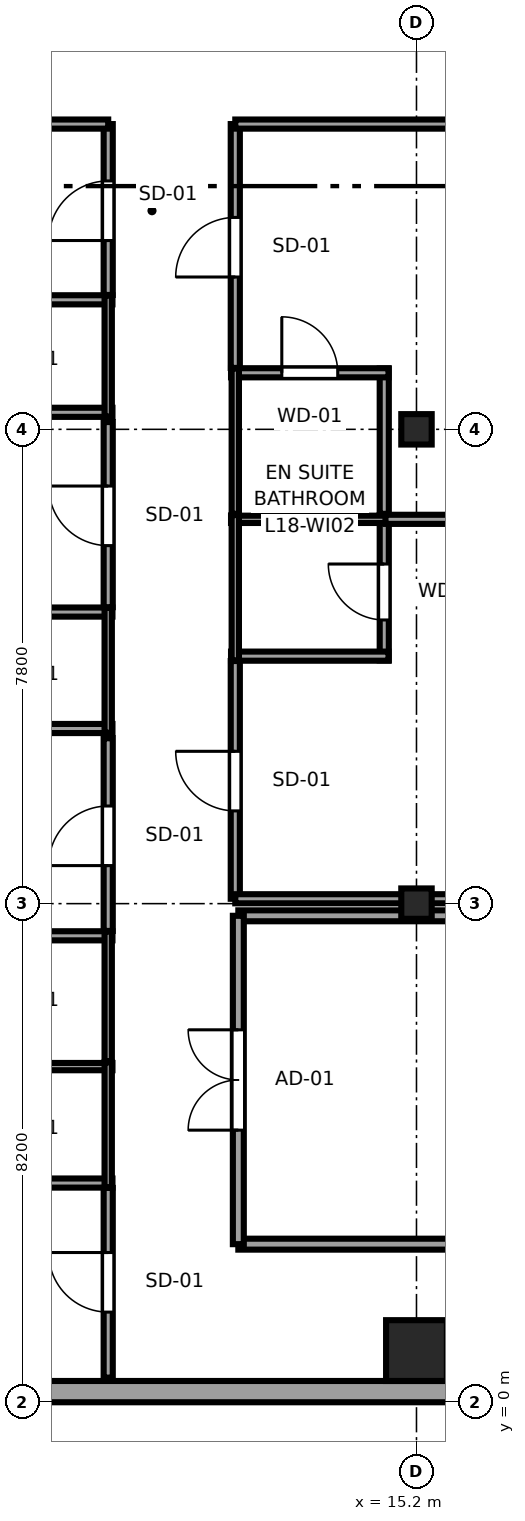
"""IFC4 building model, lengths in metres.
Left out: names, types, materials, properties, quantities, classifications, styles, units other than length and angle.
Written with IfcOpenShell. Run it as: python <this file> out.ifc"""

import sys

from ifc_helpers import new_model, si_unit, direction, frame, frame_2d, origin, origin_2d, place, context, subcontext, project, spatial, rectangle, i_section, extrude, source, transform, mapped, element, fill, save


model = new_model("IFC4")
c1 = context("Model", 3, precision=1e-05, world=origin(), true_north=direction((0.0, 1.0)))
c2 = subcontext(c1, "Body", "Model", "MODEL_VIEW")
j1 = project(units=[si_unit("LENGTHUNIT", "METRE"), si_unit("PLANEANGLEUNIT", "RADIAN")], contexts=[c1])
p1 = place(None, origin())
s1 = spatial("IfcSite", under=j1, at=p1, CompositionType="ELEMENT")
p2 = place(p1, origin())
s2 = spatial("IfcBuilding", under=s1, at=p2, CompositionType="ELEMENT")
p3 = place(p2, frame((0.0, 0.0, 74.6)))
s3 = spatial("IfcBuildingStorey", under=s2, at=p3, CompositionType="ELEMENT", Elevation=74.6)
m1 = source(origin(), c2, "Body", "SweptSolid", [
    extrude(rectangle(XDim=1.0, YDim=1.0, at=origin_2d()), origin(), (0.0, 0.0, 1.0), 3.55),
])
p4 = place(p3, frame((15.2, 0.85, 0.0), z_axis=(0.0, 0.0, 1.0), x_axis=(1.0, 0.0, 0.0)))
e1 = element("IfcColumn", 1, at=p4, inside=s3, PredefinedType="COLUMN", context=c2, shape_type="MappedRepresentation", body=[
    mapped(m1, transform((0.0, 0.0, 0.0), x_axis=(1.0, 0.0, 0.0), y_axis=(0.0, 1.0, 0.0), z_axis=(0.0, 0.0, 1.0), scale=1.0)),
])
m2 = source(origin(), c2, "Body", "SweptSolid", [
    extrude(i_section(OverallWidth=0.5, OverallDepth=0.5, WebThickness=0.028, FlangeThickness=0.045, at=origin_2d()), origin(), (0.0, 0.0, 1.0), 3.55),
])
for number, where, z_axis, x_axis in (
    (2, (15.2, 8.2, 0.0), (0.0, 0.0, 1.0), (1.0, 0.0, 0.0)),
    (3, (15.2, 16.0, 0.0), (0.0, 0.0, 1.0), (1.0, 0.0, 0.0)),
):
    element("IfcColumn", number, at=place(p3, frame(where, z_axis=z_axis, x_axis=x_axis)), inside=s3, PredefinedType="COLUMN", context=c2, shape_type="MappedRepresentation", body=[
        mapped(m2, transform((0.0, 0.0, 0.0), x_axis=(1.0, 0.0, 0.0), y_axis=(0.0, 1.0, 0.0), z_axis=(0.0, 0.0, 1.0), scale=1.0)),
    ])
p5 = place(p3, frame((4.617, 0.175, 0.0), z_axis=(0.0, 0.0, 1.0), x_axis=(1.0, 0.0, 0.0)))
e4 = element("IfcWall", 4, at=p5, inside=s3, PredefinedType="SOLIDWALL", context=c2, shape_type="SweptSolid", body=[
    extrude(rectangle(XDim=18.008, YDim=0.35, at=frame_2d((9.004, 0.0))), origin(), (0.0, 0.0, 1.0), 3.37),
])
p6 = place(p5, frame((14.257, 0.0, 0.68)))
e5 = element("IfcOpeningElement", 5, at=p6, cuts=e4, PredefinedType="OPENING", context=c2, shape_type="SweptSolid", body=[
    extrude(rectangle(XDim=2.1, YDim=1.9, at=frame_2d((1.05, 0.95))), frame((0.0, 0.185, 0.0), z_axis=(0.0, -1.0, 0.0), x_axis=(1.0, 0.0, 0.0)), (0.0, 0.0, 1.0), 0.37),
])
p7 = place(p5, frame((0.8, 0.0, 0.62)))
e6 = element("IfcOpeningElement", 6, at=p7, cuts=e4, PredefinedType="OPENING", context=c2, shape_type="SweptSolid", body=[
    extrude(rectangle(XDim=1.5, YDim=1.55, at=frame_2d((0.75, 0.775))), frame((0.0, 0.185, 0.0), z_axis=(0.0, -1.0, 0.0), x_axis=(1.0, 0.0, 0.0)), (0.0, 0.0, 1.0), 0.37),
])
p8 = place(p3, frame((7.61, 3.605, 0.0), z_axis=(0.0, 0.0, 1.0), x_axis=(1.0, 0.0, 0.0)))
e7 = element("IfcWall", 7, at=p8, inside=s3, PredefinedType="PARTITIONING", context=c2, shape_type="SweptSolid", body=[
    extrude(rectangle(XDim=2.59, YDim=0.15, at=frame_2d((1.295, 0.0))), origin(), (0.0, 0.0, 1.0), 3.37),
])
p9 = place(p3, frame((7.61, 5.52, 0.0), z_axis=(0.0, 0.0, 1.0), x_axis=(1.0, 0.0, 0.0)))
e8 = element("IfcWall", 8, at=p9, inside=s3, PredefinedType="PLUMBINGWALL", context=c2, shape_type="SweptSolid", body=[
    extrude(rectangle(XDim=2.59, YDim=0.12, at=frame_2d((1.295, 0.0))), origin(), (0.0, 0.0, 1.0), 3.37),
])
p10 = place(p3, frame((10.13, 3.535, 0.0), z_axis=(0.0, 0.0, 1.0), x_axis=(0.0, 1.0, 0.0)))
e9 = element("IfcWall", 9, at=p10, inside=s3, PredefinedType="PLUMBINGWALL", context=c2, shape_type="SweptSolid", body=[
    extrude(rectangle(XDim=2.055, YDim=0.12, at=frame_2d((1.028, 0.0))), origin(), (0.0, 0.0, 1.0), 3.37),
])
p11 = place(p3, frame((7.61, 7.671, 0.0), z_axis=(0.0, 0.0, 1.0), x_axis=(1.0, 0.0, 0.0)))
e10 = element("IfcWall", 10, at=p11, inside=s3, PredefinedType="PARTITIONING", context=c2, shape_type="SweptSolid", body=[
    extrude(rectangle(XDim=2.59, YDim=0.15, at=frame_2d((1.295, 0.0))), origin(), (0.0, 0.0, 1.0), 3.37),
])
p12 = place(p3, frame((10.13, 5.61, 0.0), z_axis=(0.0, 0.0, 1.0), x_axis=(0.0, 1.0, 0.0)))
e11 = element("IfcWall", 11, at=p12, inside=s3, PredefinedType="PLUMBINGWALL", context=c2, shape_type="SweptSolid", body=[
    extrude(rectangle(XDim=2.131, YDim=0.12, at=frame_2d((1.065, 0.0))), origin(), (0.0, 0.0, 1.0), 3.37),
])
p13 = place(p3, frame((0.405, 11.08, 0.0), z_axis=(0.0, 0.0, 1.0), x_axis=(1.0, 0.0, 0.0)))
e12 = element("IfcWall", 12, at=p13, inside=s3, PredefinedType="PARTITIONING", context=c2, shape_type="SweptSolid", body=[
    extrude(rectangle(XDim=9.795, YDim=0.15, at=frame_2d((4.897, 0.0))), origin(), (0.0, 0.0, 1.0), 3.37),
])
p14 = place(p3, frame((7.61, 12.995, 0.0), z_axis=(0.0, 0.0, 1.0), x_axis=(1.0, 0.0, 0.0)))
e13 = element("IfcWall", 13, at=p14, inside=s3, PredefinedType="PARTITIONING", context=c2, shape_type="SweptSolid", body=[
    extrude(rectangle(XDim=2.59, YDim=0.15, at=frame_2d((1.295, 0.0))), origin(), (0.0, 0.0, 1.0), 3.37),
])
p15 = place(p3, frame((10.13, 11.01, 0.0), z_axis=(0.0, 0.0, 1.0), x_axis=(0.0, 1.0, 0.0)))
e14 = element("IfcWall", 14, at=p15, inside=s3, PredefinedType="PLUMBINGWALL", context=c2, shape_type="SweptSolid", body=[
    extrude(rectangle(XDim=2.055, YDim=0.12, at=frame_2d((1.027, 0.0))), origin(), (0.0, 0.0, 1.0), 3.37),
])
p16 = place(p3, frame((0.405, 16.28, 0.0), z_axis=(0.0, 0.0, 1.0), x_axis=(1.0, 0.0, 0.0)))
e15 = element("IfcWall", 15, at=p16, inside=s3, PredefinedType="PARTITIONING", context=c2, shape_type="SweptSolid", body=[
    extrude(rectangle(XDim=9.795, YDim=0.15, at=frame_2d((4.897, 0.0))), origin(), (0.0, 0.0, 1.0), 3.37),
])
p17 = place(p3, frame((7.61, 18.13, 0.0), z_axis=(0.0, 0.0, 1.0), x_axis=(1.0, 0.0, 0.0)))
e16 = element("IfcWall", 16, at=p17, inside=s3, PredefinedType="PARTITIONING", context=c2, shape_type="SweptSolid", body=[
    extrude(rectangle(XDim=2.59, YDim=0.15, at=frame_2d((1.295, 0.0))), origin(), (0.0, 0.0, 1.0), 3.37),
])
p18 = place(p3, frame((10.13, 16.21, 0.0), z_axis=(0.0, 0.0, 1.0), x_axis=(0.0, 1.0, 0.0)))
e17 = element("IfcWall", 17, at=p18, inside=s3, PredefinedType="PLUMBINGWALL", context=c2, shape_type="SweptSolid", body=[
    extrude(rectangle(XDim=1.99, YDim=0.12, at=frame_2d((0.995, 0.0))), origin(), (0.0, 0.0, 1.0), 3.37),
])
p19 = place(p3, frame((14.67, 12.2, 0.0), z_axis=(0.0, 0.0, 1.0), x_axis=(0.0, 1.0, 0.0)))
e18 = element("IfcWall", 18, at=p19, inside=s3, PredefinedType="PARTITIONING", context=c2, shape_type="SweptSolid", body=[
    extrude(rectangle(XDim=2.39, YDim=0.15, at=frame_2d((1.195, 0.0))), origin(), (0.0, 0.0, 1.0), 3.37),
])
p20 = place(p19, frame((0.665, 0.0, 0.0)))
e19 = element("IfcOpeningElement", 19, at=p20, cuts=e18, PredefinedType="OPENING", context=c2, shape_type="SweptSolid", body=[
    extrude(rectangle(XDim=0.92, YDim=2.01, at=frame_2d((0.46, 1.005))), frame((0.0, 0.085, 0.0), z_axis=(0.0, -1.0, 0.0), x_axis=(1.0, 0.0, 0.0)), (0.0, 0.0, 1.0), 0.17),
])
p21 = place(p3, frame((12.15, 12.27, 0.0), z_axis=(0.0, 0.0, 1.0), x_axis=(1.0, 0.0, 0.0)))
e20 = element("IfcWall", 20, at=p21, inside=s3, PredefinedType="PARTITIONING", context=c2, shape_type="SweptSolid", body=[
    extrude(rectangle(XDim=2.59, YDim=0.15, at=frame_2d((1.295, 0.0))), origin(), (0.0, 0.0, 1.0), 3.37),
])
p22 = place(p3, frame((12.15, 14.52, 0.0), z_axis=(0.0, 0.0, 1.0), x_axis=(1.0, 0.0, 0.0)))
e21 = element("IfcWall", 21, at=p22, inside=s3, PredefinedType="PLUMBINGWALL", context=c2, shape_type="SweptSolid", body=[
    extrude(rectangle(XDim=2.59, YDim=0.12, at=frame_2d((1.295, 0.0))), origin(), (0.0, 0.0, 1.0), 3.37),
])
p23 = place(p3, frame((12.22, 12.2, 0.0), z_axis=(0.0, 0.0, 1.0), x_axis=(0.0, 1.0, 0.0)))
e22 = element("IfcWall", 22, at=p23, inside=s3, PredefinedType="PLUMBINGWALL", context=c2, shape_type="SweptSolid", body=[
    extrude(rectangle(XDim=2.39, YDim=0.12, at=frame_2d((1.195, 0.0))), origin(), (0.0, 0.0, 1.0), 3.37),
])
p24 = place(p3, frame((14.67, 14.61, 0.0), z_axis=(0.0, 0.0, 1.0), x_axis=(0.0, 1.0, 0.0)))
e23 = element("IfcWall", 23, at=p24, inside=s3, PredefinedType="PARTITIONING", context=c2, shape_type="SweptSolid", body=[
    extrude(rectangle(XDim=2.39, YDim=0.15, at=frame_2d((1.195, 0.0))), origin(), (0.0, 0.0, 1.0), 3.37),
])
p25 = place(p3, frame((12.15, 16.93, 0.0), z_axis=(0.0, 0.0, 1.0), x_axis=(1.0, 0.0, 0.0)))
e24 = element("IfcWall", 24, at=p25, inside=s3, PredefinedType="PARTITIONING", context=c2, shape_type="SweptSolid", body=[
    extrude(rectangle(XDim=2.59, YDim=0.15, at=frame_2d((1.295, 0.0))), origin(), (0.0, 0.0, 1.0), 3.37),
])
p26 = place(p25, frame((0.835, 0.0, 0.0)))
e25 = element("IfcOpeningElement", 25, at=p26, cuts=e24, PredefinedType="OPENING", context=c2, shape_type="SweptSolid", body=[
    extrude(rectangle(XDim=0.92, YDim=2.01, at=frame_2d((0.46, 1.005))), frame((0.0, 0.085, 0.0), z_axis=(0.0, -1.0, 0.0), x_axis=(1.0, 0.0, 0.0)), (0.0, 0.0, 1.0), 0.17),
])
p27 = place(p3, frame((12.22, 14.61, 0.0), z_axis=(0.0, 0.0, 1.0), x_axis=(0.0, 1.0, 0.0)))
e26 = element("IfcWall", 26, at=p27, inside=s3, PredefinedType="PLUMBINGWALL", context=c2, shape_type="SweptSolid", body=[
    extrude(rectangle(XDim=2.39, YDim=0.12, at=frame_2d((1.195, 0.0))), origin(), (0.0, 0.0, 1.0), 3.37),
])
p28 = place(p3, frame((10.13, 0.405, 0.0), z_axis=(0.0, 0.0, 1.0), x_axis=(0.0, 1.0, 0.0)))
e27 = element("IfcWall", 27, at=p28, inside=s3, PredefinedType="PARTITIONING", context=c2, shape_type="SweptSolid", body=[
    extrude(rectangle(XDim=3.12, YDim=0.15, at=frame_2d((1.56, 0.0))), origin(), (0.0, 0.0, 1.0), 3.37),
])
p29 = place(p28, frame((1.077, 0.0, 0.0)))
e28 = element("IfcOpeningElement", 28, at=p29, cuts=e27, PredefinedType="OPENING", context=c2, shape_type="SweptSolid", body=[
    extrude(rectangle(XDim=0.98, YDim=2.12, at=frame_2d((0.49, 1.06))), frame((0.0, 0.085, 0.0), z_axis=(0.0, -1.0, 0.0), x_axis=(1.0, 0.0, 0.0)), (0.0, 0.0, 1.0), 0.17),
])
p30 = place(p3, frame((10.13, 7.751, 0.0), z_axis=(0.0, 0.0, 1.0), x_axis=(0.0, 1.0, 0.0)))
e29 = element("IfcWall", 29, at=p30, inside=s3, PredefinedType="PARTITIONING", context=c2, shape_type="SweptSolid", body=[
    extrude(rectangle(XDim=3.169, YDim=0.15, at=frame_2d((1.584, 0.0))), origin(), (0.0, 0.0, 1.0), 3.37),
])
p31 = place(p30, frame((1.074, 0.0, 0.0)))
e30 = element("IfcOpeningElement", 30, at=p31, cuts=e29, PredefinedType="OPENING", context=c2, shape_type="SweptSolid", body=[
    extrude(rectangle(XDim=0.98, YDim=2.12, at=frame_2d((0.49, 1.06))), frame((0.0, 0.085, 0.0), z_axis=(0.0, -1.0, 0.0), x_axis=(1.0, 0.0, 0.0)), (0.0, 0.0, 1.0), 0.17),
])
p32 = place(p3, frame((10.13, 13.075, 0.0), z_axis=(0.0, 0.0, 1.0), x_axis=(0.0, 1.0, 0.0)))
e31 = element("IfcWall", 31, at=p32, inside=s3, PredefinedType="PARTITIONING", context=c2, shape_type="SweptSolid", body=[
    extrude(rectangle(XDim=3.045, YDim=0.15, at=frame_2d((1.522, 0.0))), origin(), (0.0, 0.0, 1.0), 3.37),
])
p33 = place(p32, frame((1.012, 0.0, 0.0)))
e32 = element("IfcOpeningElement", 32, at=p33, cuts=e31, PredefinedType="OPENING", context=c2, shape_type="SweptSolid", body=[
    extrude(rectangle(XDim=0.98, YDim=2.12, at=frame_2d((0.49, 1.06))), frame((0.0, 0.085, 0.0), z_axis=(0.0, -1.0, 0.0), x_axis=(1.0, 0.0, 0.0)), (0.0, 0.0, 1.0), 0.17),
])
p34 = place(p3, frame((10.13, 18.21, 0.0), z_axis=(0.0, 0.0, 1.0), x_axis=(0.0, 1.0, 0.0)))
e33 = element("IfcWall", 33, at=p34, inside=s3, PredefinedType="PARTITIONING", context=c2, shape_type="SweptSolid", body=[
    extrude(rectangle(XDim=2.81, YDim=0.15, at=frame_2d((1.405, 0.0))), origin(), (0.0, 0.0, 1.0), 3.37),
])
p35 = place(p34, frame((0.895, 0.0, 0.0)))
e34 = element("IfcOpeningElement", 34, at=p35, cuts=e33, PredefinedType="OPENING", context=c2, shape_type="SweptSolid", body=[
    extrude(rectangle(XDim=0.98, YDim=2.12, at=frame_2d((0.49, 1.06))), frame((0.0, 0.085, 0.0), z_axis=(0.0, -1.0, 0.0), x_axis=(1.0, 0.0, 0.0)), (0.0, 0.0, 1.0), 0.17),
])
p36 = place(p3, frame((0.405, 21.02, 0.0), z_axis=(0.0, 0.0, 1.0), x_axis=(1.0, 0.0, 0.0)))
e35 = element("IfcWall", 35, at=p36, inside=s3, PredefinedType="PARTITIONING", context=c2, shape_type="SweptSolid", body=[
    extrude(rectangle(XDim=9.725, YDim=0.15, at=frame_2d((4.862, 0.0))), origin(), (0.0, 0.0, 1.0), 3.37),
])
p37 = place(p3, frame((12.22, 8.28, 0.0), z_axis=(0.0, 0.0, 1.0), x_axis=(0.0, 1.0, 0.0)))
e36 = element("IfcWall", 36, at=p37, inside=s3, PredefinedType="PARTITIONING", context=c2, shape_type="SweptSolid", body=[
    extrude(rectangle(XDim=3.91, YDim=0.15, at=frame_2d((1.955, 0.0))), origin(), (0.0, 0.0, 1.0), 3.37),
])
p38 = place(p37, frame((1.445, 0.0, 0.0)))
e37 = element("IfcOpeningElement", 37, at=p38, cuts=e36, PredefinedType="OPENING", context=c2, shape_type="SweptSolid", body=[
    extrude(rectangle(XDim=0.98, YDim=2.12, at=frame_2d((0.49, 1.06))), frame((0.0, 0.085, 0.0), z_axis=(0.0, -1.0, 0.0), x_axis=(1.0, 0.0, 0.0)), (0.0, 0.0, 1.0), 0.17),
])
p39 = place(p3, frame((12.22, 8.28, 0.0), z_axis=(0.0, 0.0, 1.0), x_axis=(1.0, 0.0, 0.0)))
e38 = element("IfcWall", 38, at=p39, inside=s3, PredefinedType="PARTITIONING", context=c2, shape_type="SweptSolid", body=[
    extrude(rectangle(XDim=10.13, YDim=0.15, at=frame_2d((5.065, 0.0))), origin(), (0.0, 0.0, 1.0), 2.748),
])
p40 = place(p3, frame((14.69, 14.52, 0.0), z_axis=(0.0, 0.0, 1.0), x_axis=(1.0, 0.0, 0.0)))
e39 = element("IfcWall", 39, at=p40, inside=s3, PredefinedType="PARTITIONING", context=c2, shape_type="SweptSolid", body=[
    extrude(rectangle(XDim=7.66, YDim=0.15, at=frame_2d((3.83, 0.0))), origin(), (0.0, 0.0, 1.0), 3.37),
])
p41 = place(p3, frame((12.22, 17.01, 0.0), z_axis=(0.0, 0.0, 1.0), x_axis=(0.0, 1.0, 0.0)))
e40 = element("IfcWall", 40, at=p41, inside=s3, PredefinedType="PARTITIONING", context=c2, shape_type="SweptSolid", body=[
    extrude(rectangle(XDim=4.01, YDim=0.15, at=frame_2d((2.005, 0.0))), origin(), (0.0, 0.0, 1.0), 3.37),
])
p42 = place(p41, frame((1.495, 0.0, 0.0)))
e41 = element("IfcOpeningElement", 41, at=p42, cuts=e40, PredefinedType="OPENING", context=c2, shape_type="SweptSolid", body=[
    extrude(rectangle(XDim=0.98, YDim=2.12, at=frame_2d((0.49, 1.06))), frame((0.0, 0.085, 0.0), z_axis=(0.0, -1.0, 0.0), x_axis=(1.0, 0.0, 0.0)), (0.0, 0.0, 1.0), 0.17),
])
p43 = place(p3, frame((12.22, 21.02, 0.0), z_axis=(0.0, 0.0, 1.0), x_axis=(1.0, 0.0, 0.0)))
e42 = element("IfcWall", 42, at=p43, inside=s3, PredefinedType="PARTITIONING", context=c2, shape_type="SweptSolid", body=[
    extrude(rectangle(XDim=10.13, YDim=0.15, at=frame_2d((5.065, 0.0))), origin(), (0.0, 0.0, 1.0), 3.37),
])
for number, where, z_axis, x_axis in (
    (43, (12.27, 2.6, 0.0), (0.0, 0.0, 1.0), (1.0, 0.0, 0.0)),
    (44, (12.27, 8.0, 0.0), (0.0, 0.0, 1.0), (1.0, 0.0, 0.0)),
):
    element("IfcWall", number, at=place(p3, frame(where, z_axis=z_axis, x_axis=x_axis)), inside=s3, PredefinedType="PARTITIONING", context=c2, shape_type="SweptSolid", body=[
        extrude(rectangle(XDim=34.01, YDim=0.18, at=frame_2d((17.005, 0.0))), origin(), (0.0, 0.0, 1.0), 3.37),
    ])
p44 = place(p3, frame((12.27, 2.6, 0.0), z_axis=(0.0, 0.0, 1.0), x_axis=(0.0, 1.0, 0.0)))
e45 = element("IfcWall", 45, at=p44, inside=s3, PredefinedType="PARTITIONING", context=c2, shape_type="SweptSolid", body=[
    extrude(rectangle(XDim=5.4, YDim=0.18, at=frame_2d((2.7, 0.0))), origin(), (0.0, 0.0, 1.0), 3.37),
])
p45 = place(p44, frame((1.875, 0.0, 0.0)))
e46 = element("IfcOpeningElement", 46, at=p45, cuts=e45, PredefinedType="OPENING", context=c2, shape_type="SweptSolid", body=[
    extrude(rectangle(XDim=1.65, YDim=2.15, at=frame_2d((0.825, 1.075))), frame((0.0, 0.1, 0.0), z_axis=(0.0, -1.0, 0.0), x_axis=(1.0, 0.0, 0.0)), (0.0, 0.0, 1.0), 0.2),
])
m3 = source(origin(), c2, "Body", "SweptSolid", [
    extrude(rectangle(XDim=0.92, YDim=2.01, at=frame_2d((0.46, 1.005))), frame((0.0, 0.025, 0.0), z_axis=(0.0, -1.0, 0.0), x_axis=(1.0, 0.0, 0.0)), (0.0, 0.0, 1.0), 0.05),
])
p46 = place(p20, origin())
e47 = element("IfcDoor", 47, at=p46, inside=s3, OperationType="SINGLE_SWING_RIGHT", PredefinedType="DOOR", context=c2, shape_type="MappedRepresentation", body=[
    mapped(m3, transform((0.0, 0.0, 0.0), x_axis=(1.0, 0.0, 0.0), y_axis=(0.0, 1.0, 0.0), z_axis=(0.0, 0.0, 1.0), scale=1.0)),
])
fill(e19, e47)
p47 = place(p26, origin())
e48 = element("IfcDoor", 48, at=p47, inside=s3, OperationType="SINGLE_SWING_LEFT", PredefinedType="DOOR", context=c2, shape_type="MappedRepresentation", body=[
    mapped(m3, transform((0.0, 0.0, 0.0), x_axis=(1.0, 0.0, 0.0), y_axis=(0.0, 1.0, 0.0), z_axis=(0.0, 0.0, 1.0), scale=1.0)),
])
fill(e25, e48)
m4 = source(origin(), c2, "Body", "SweptSolid", [
    extrude(rectangle(XDim=0.98, YDim=2.12, at=frame_2d((0.49, 1.06))), frame((0.0, 0.025, 0.0), z_axis=(0.0, -1.0, 0.0), x_axis=(1.0, 0.0, 0.0)), (0.0, 0.0, 1.0), 0.05),
])
p48 = place(p29, origin())
e49 = element("IfcDoor", 49, at=p48, inside=s3, OperationType="SINGLE_SWING_RIGHT", PredefinedType="DOOR", context=c2, shape_type="MappedRepresentation", body=[
    mapped(m4, transform((0.0, 0.0, 0.0), x_axis=(1.0, 0.0, 0.0), y_axis=(0.0, 1.0, 0.0), z_axis=(0.0, 0.0, 1.0), scale=1.0)),
])
fill(e28, e49)
p49 = place(p31, origin())
e50 = element("IfcDoor", 50, at=p49, inside=s3, OperationType="SINGLE_SWING_LEFT", PredefinedType="DOOR", context=c2, shape_type="MappedRepresentation", body=[
    mapped(m4, transform((0.0, 0.0, 0.0), x_axis=(1.0, 0.0, 0.0), y_axis=(0.0, 1.0, 0.0), z_axis=(0.0, 0.0, 1.0), scale=1.0)),
])
fill(e30, e50)
p50 = place(p33, origin())
e51 = element("IfcDoor", 51, at=p50, inside=s3, OperationType="SINGLE_SWING_RIGHT", PredefinedType="DOOR", context=c2, shape_type="MappedRepresentation", body=[
    mapped(m4, transform((0.0, 0.0, 0.0), x_axis=(1.0, 0.0, 0.0), y_axis=(0.0, 1.0, 0.0), z_axis=(0.0, 0.0, 1.0), scale=1.0)),
])
fill(e32, e51)
p51 = place(p35, origin())
e52 = element("IfcDoor", 52, at=p51, inside=s3, OperationType="SINGLE_SWING_LEFT", PredefinedType="DOOR", context=c2, shape_type="MappedRepresentation", body=[
    mapped(m4, transform((0.0, 0.0, 0.0), x_axis=(1.0, 0.0, 0.0), y_axis=(0.0, 1.0, 0.0), z_axis=(0.0, 0.0, 1.0), scale=1.0)),
])
fill(e34, e52)
p52 = place(p38, origin())
e53 = element("IfcDoor", 53, at=p52, inside=s3, OperationType="SINGLE_SWING_RIGHT", PredefinedType="DOOR", context=c2, shape_type="MappedRepresentation", body=[
    mapped(m4, transform((0.0, 0.0, 0.0), x_axis=(1.0, 0.0, 0.0), y_axis=(0.0, 1.0, 0.0), z_axis=(0.0, 0.0, 1.0), scale=1.0)),
])
fill(e37, e53)
p53 = place(p42, origin())
e54 = element("IfcDoor", 54, at=p53, inside=s3, OperationType="SINGLE_SWING_LEFT", PredefinedType="DOOR", context=c2, shape_type="MappedRepresentation", body=[
    mapped(m4, transform((0.0, 0.0, 0.0), x_axis=(1.0, 0.0, 0.0), y_axis=(0.0, 1.0, 0.0), z_axis=(0.0, 0.0, 1.0), scale=1.0)),
])
fill(e41, e54)
m5 = source(origin(), c2, "Body", "SweptSolid", [
    extrude(rectangle(XDim=1.65, YDim=2.15, at=frame_2d((0.825, 1.075))), frame((0.0, 0.025, 0.0), z_axis=(0.0, -1.0, 0.0), x_axis=(1.0, 0.0, 0.0)), (0.0, 0.0, 1.0), 0.05),
])
p54 = place(p45, origin())
e55 = element("IfcDoor", 55, at=p54, inside=s3, OperationType="DOUBLE_DOOR_SINGLE_SWING", PredefinedType="DOOR", context=c2, shape_type="MappedRepresentation", body=[
    mapped(m5, transform((0.0, 0.0, 0.0), x_axis=(1.0, 0.0, 0.0), y_axis=(0.0, 1.0, 0.0), z_axis=(0.0, 0.0, 1.0), scale=1.0)),
])
fill(e46, e55)
save(model, sys.argv[1])
